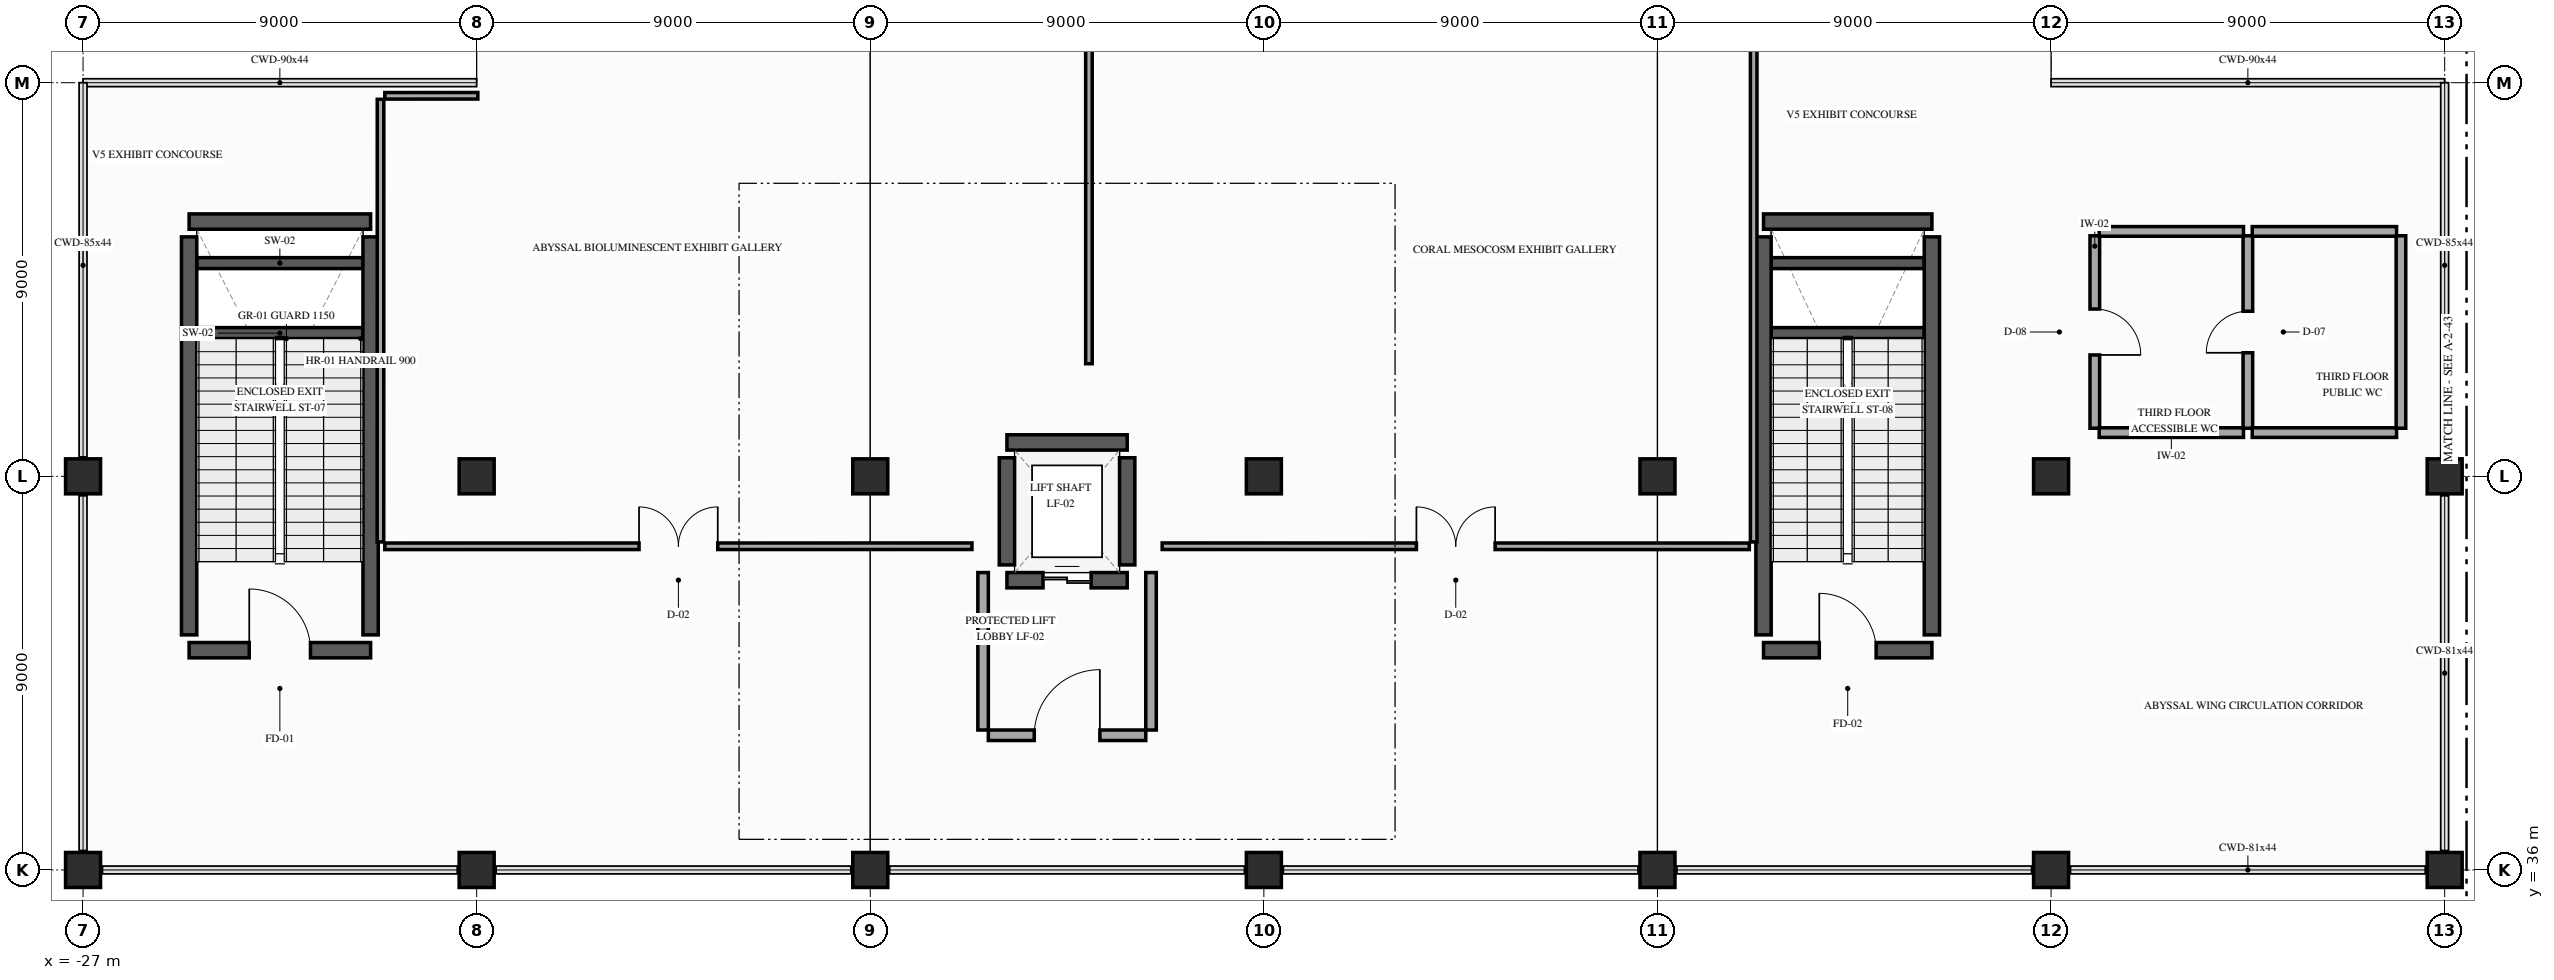
"""IFC4 building model, lengths in metres.
Left out: names, types, materials, properties, quantities, classifications, styles, units other than length and angle.
Written with IfcOpenShell. Run it as: python <this file> out.ifc"""

import sys

from ifc_helpers import new_model, si_unit, direction, frame, frame_2d, origin, origin_2d, place, context, subcontext, project, spatial, rectangle, extrude, element, fill, save


model = new_model("IFC4")
c1 = context("Model", 3, precision=1e-05, world=origin(), true_north=direction((0.0, 1.0)))
c2 = subcontext(c1, "Body", "Model", "MODEL_VIEW")
j1 = project(units=[si_unit("LENGTHUNIT", "METRE"), si_unit("PLANEANGLEUNIT", "RADIAN")], contexts=[c1])
p1 = place(None, origin())
s1 = spatial("IfcSite", under=j1, at=p1, CompositionType="ELEMENT")
p2 = place(p1, origin())
s2 = spatial("IfcBuilding", under=s1, at=p2, CompositionType="ELEMENT")
p3 = place(p2, frame((0.0, 0.0, 16.2)))
s3 = spatial("IfcBuildingStorey", under=s2, at=p3, CompositionType="ELEMENT", Elevation=16.2)
for number, where, z_axis, x_axis in (
    (1, (-27.0, 36.0, 0.0), (0.0, 0.0, 1.0), (1.0, 0.0, 0.0)),
    (2, (-27.0, 45.0, 0.0), (0.0, 0.0, 1.0), (1.0, 0.0, 0.0)),
    (3, (-18.0, 36.0, 0.0), (0.0, 0.0, 1.0), (1.0, 0.0, 0.0)),
    (4, (-18.0, 45.0, 0.0), (0.0, 0.0, 1.0), (1.0, 0.0, 0.0)),
    (5, (-9.0, 36.0, 0.0), (0.0, 0.0, 1.0), (1.0, 0.0, 0.0)),
    (6, (-9.0, 45.0, 0.0), (0.0, 0.0, 1.0), (1.0, 0.0, 0.0)),
    (7, (0.0, 36.0, 0.0), (0.0, 0.0, 1.0), (1.0, 0.0, 0.0)),
    (8, (0.0, 45.0, 0.0), (0.0, 0.0, 1.0), (1.0, 0.0, 0.0)),
    (9, (9.0, 36.0, 0.0), (0.0, 0.0, 1.0), (1.0, 0.0, 0.0)),
    (10, (9.0, 45.0, 0.0), (0.0, 0.0, 1.0), (1.0, 0.0, 0.0)),
    (11, (18.0, 36.0, 0.0), (0.0, 0.0, 1.0), (1.0, 0.0, 0.0)),
    (12, (18.0, 45.0, 0.0), (0.0, 0.0, 1.0), (1.0, 0.0, 0.0)),
    (13, (27.0, 36.0, 0.0), (0.0, 0.0, 1.0), (1.0, 0.0, 0.0)),
    (14, (27.0, 45.0, 0.0), (0.0, 0.0, 1.0), (1.0, 0.0, 0.0)),
):
    element("IfcColumn", number, at=place(p3, frame(where, z_axis=z_axis, x_axis=x_axis)), inside=s3, PredefinedType="COLUMN", context=c2, shape_type="SweptSolid", body=[
        extrude(rectangle(XDim=0.8, YDim=0.8, at=origin_2d()), origin(), (0.0, 0.0, 1.0), 5.4),
    ])
for number, where, z_axis, x_axis in (
    (15, (-24.4, 48.275, 0.0), (0.0, 0.0, 1.0), (1.0, 0.0, 0.0)),
    (16, (-24.4, 49.875, 0.0), (0.0, 0.0, 1.0), (1.0, 0.0, 0.0)),
):
    element("IfcWall", number, at=place(p3, frame(where, z_axis=z_axis, x_axis=x_axis)), inside=s3, PredefinedType="SHEAR", context=c2, shape_type="SweptSolid", body=[
        extrude(rectangle(XDim=3.8, YDim=0.25, at=frame_2d((1.9, 0.0))), origin(), (0.0, 0.0, 1.0), 2.5),
    ])
p4 = place(p3, frame((-24.575, 41.025, 0.0), z_axis=(0.0, 0.0, 1.0), x_axis=(1.0, 0.0, 0.0)))
e17 = element("IfcWall", 17, at=p4, inside=s3, PredefinedType="SHEAR", context=c2, shape_type="SweptSolid", body=[
    extrude(rectangle(XDim=4.15, YDim=0.35, at=frame_2d((2.075, 0.0))), origin(), (0.0, 0.0, 1.0), 5.15),
])
p5 = place(p4, frame((1.375, 0.0, 0.0)))
e18 = element("IfcOpeningElement", 18, at=p5, cuts=e17, PredefinedType="OPENING", context=c2, shape_type="SweptSolid", body=[
    extrude(rectangle(XDim=1.4, YDim=2.2, at=frame_2d((0.7, 1.1))), frame((0.0, 0.185, 0.0), z_axis=(0.0, -1.0, 0.0), x_axis=(1.0, 0.0, 0.0)), (0.0, 0.0, 1.0), 0.37),
])
p6 = place(p3, frame((-24.575, 50.825, 0.0), z_axis=(0.0, 0.0, 1.0), x_axis=(1.0, 0.0, 0.0)))
e19 = element("IfcWall", 19, at=p6, inside=s3, PredefinedType="SHEAR", context=c2, shape_type="SweptSolid", body=[
    extrude(rectangle(XDim=4.15, YDim=0.35, at=frame_2d((2.075, 0.0))), origin(), (0.0, 0.0, 1.0), 5.15),
])
for number, where, z_axis, x_axis in (
    (20, (-24.575, 41.375, 0.0), (0.0, 0.0, 1.0), (0.0, 1.0, 0.0)),
    (21, (-20.425, 41.375, 0.0), (0.0, 0.0, 1.0), (0.0, 1.0, 0.0)),
):
    element("IfcWall", number, at=place(p3, frame(where, z_axis=z_axis, x_axis=x_axis)), inside=s3, PredefinedType="SHEAR", context=c2, shape_type="SweptSolid", body=[
        extrude(rectangle(XDim=9.1, YDim=0.35, at=frame_2d((4.55, 0.0))), origin(), (0.0, 0.0, 1.0), 5.15),
    ])
for number, where, z_axis, x_axis in (
    (22, (11.6, 48.275, 0.0), (0.0, 0.0, 1.0), (1.0, 0.0, 0.0)),
    (23, (11.6, 49.875, 0.0), (0.0, 0.0, 1.0), (1.0, 0.0, 0.0)),
):
    element("IfcWall", number, at=place(p3, frame(where, z_axis=z_axis, x_axis=x_axis)), inside=s3, PredefinedType="SHEAR", context=c2, shape_type="SweptSolid", body=[
        extrude(rectangle(XDim=3.5, YDim=0.25, at=frame_2d((1.75, 0.0))), origin(), (0.0, 0.0, 1.0), 2.5),
    ])
p7 = place(p3, frame((11.425, 41.025, 0.0), z_axis=(0.0, 0.0, 1.0), x_axis=(1.0, 0.0, 0.0)))
e24 = element("IfcWall", 24, at=p7, inside=s3, PredefinedType="SHEAR", context=c2, shape_type="SweptSolid", body=[
    extrude(rectangle(XDim=3.85, YDim=0.35, at=frame_2d((1.925, 0.0))), origin(), (0.0, 0.0, 1.0), 5.15),
])
p8 = place(p7, frame((1.275, 0.0, 0.0)))
e25 = element("IfcOpeningElement", 25, at=p8, cuts=e24, PredefinedType="OPENING", context=c2, shape_type="SweptSolid", body=[
    extrude(rectangle(XDim=1.3, YDim=2.2, at=frame_2d((0.65, 1.1))), frame((0.0, 0.185, 0.0), z_axis=(0.0, -1.0, 0.0), x_axis=(1.0, 0.0, 0.0)), (0.0, 0.0, 1.0), 0.37),
])
p9 = place(p3, frame((11.425, 50.825, 0.0), z_axis=(0.0, 0.0, 1.0), x_axis=(1.0, 0.0, 0.0)))
e26 = element("IfcWall", 26, at=p9, inside=s3, PredefinedType="SHEAR", context=c2, shape_type="SweptSolid", body=[
    extrude(rectangle(XDim=3.85, YDim=0.35, at=frame_2d((1.925, 0.0))), origin(), (0.0, 0.0, 1.0), 5.15),
])
for number, where, z_axis, x_axis in (
    (27, (11.425, 41.375, 0.0), (0.0, 0.0, 1.0), (0.0, 1.0, 0.0)),
    (28, (15.275, 41.375, 0.0), (0.0, 0.0, 1.0), (0.0, 1.0, 0.0)),
):
    element("IfcWall", number, at=place(p3, frame(where, z_axis=z_axis, x_axis=x_axis)), inside=s3, PredefinedType="SHEAR", context=c2, shape_type="SweptSolid", body=[
        extrude(rectangle(XDim=9.1, YDim=0.35, at=frame_2d((4.55, 0.0))), origin(), (0.0, 0.0, 1.0), 5.15),
    ])
p10 = place(p3, frame((-5.875, 42.625, 0.0), z_axis=(0.0, 0.0, 1.0), x_axis=(1.0, 0.0, 0.0)))
e29 = element("IfcWall", 29, at=p10, inside=s3, PredefinedType="SHEAR", context=c2, shape_type="SweptSolid", body=[
    extrude(rectangle(XDim=2.75, YDim=0.35, at=frame_2d((1.375, 0.0))), origin(), (0.0, 0.0, 1.0), 5.15),
])
p11 = place(p10, frame((0.825, 0.0, 0.0)))
e30 = element("IfcOpeningElement", 30, at=p11, cuts=e29, PredefinedType="OPENING", context=c2, shape_type="SweptSolid", body=[
    extrude(rectangle(XDim=1.1, YDim=2.2, at=frame_2d((0.55, 1.1))), frame((0.0, 0.185, 0.0), z_axis=(0.0, -1.0, 0.0), x_axis=(1.0, 0.0, 0.0)), (0.0, 0.0, 1.0), 0.37),
])
p12 = place(p3, frame((-3.125, 45.775, 0.0), z_axis=(0.0, 0.0, 1.0), x_axis=(-1.0, 0.0, 0.0)))
e31 = element("IfcWall", 31, at=p12, inside=s3, PredefinedType="SHEAR", context=c2, shape_type="SweptSolid", body=[
    extrude(rectangle(XDim=2.75, YDim=0.35, at=frame_2d((1.375, 0.0))), origin(), (0.0, 0.0, 1.0), 5.15),
])
for number, where, z_axis, x_axis in (
    (32, (-5.875, 42.975, 0.0), (0.0, 0.0, 1.0), (0.0, 1.0, 0.0)),
    (33, (-3.125, 42.975, 0.0), (0.0, 0.0, 1.0), (0.0, 1.0, 0.0)),
):
    element("IfcWall", number, at=place(p3, frame(where, z_axis=z_axis, x_axis=x_axis)), inside=s3, PredefinedType="SHEAR", context=c2, shape_type="SweptSolid", body=[
        extrude(rectangle(XDim=2.45, YDim=0.35, at=frame_2d((1.225, 0.0))), origin(), (0.0, 0.0, 1.0), 5.15),
    ])
p13 = place(p3, frame((-6.3, 39.08, 0.0), z_axis=(0.0, 0.0, 1.0), x_axis=(1.0, 0.0, 0.0)))
e34 = element("IfcWall", 34, at=p13, inside=s3, PredefinedType="PARTITIONING", context=c2, shape_type="SweptSolid", body=[
    extrude(rectangle(XDim=3.6, YDim=0.24, at=frame_2d((1.8, 0.0))), origin(), (0.0, 0.0, 1.0), 4.635),
])
p14 = place(p13, frame((1.05, 0.0, 0.0)))
e35 = element("IfcOpeningElement", 35, at=p14, cuts=e34, PredefinedType="OPENING", context=c2, shape_type="SweptSolid", body=[
    extrude(rectangle(XDim=1.5, YDim=2.2, at=frame_2d((0.75, 1.1))), frame((0.0, 0.13, 0.0), z_axis=(0.0, -1.0, 0.0), x_axis=(1.0, 0.0, 0.0)), (0.0, 0.0, 1.0), 0.26),
])
for number, where, z_axis, x_axis in (
    (36, (-6.42, 39.2, 0.0), (0.0, 0.0, 1.0), (0.0, 1.0, 0.0)),
    (37, (-2.58, 39.2, 0.0), (0.0, 0.0, 1.0), (0.0, 1.0, 0.0)),
):
    element("IfcWall", number, at=place(p3, frame(where, z_axis=z_axis, x_axis=x_axis)), inside=s3, PredefinedType="PARTITIONING", context=c2, shape_type="SweptSolid", body=[
        extrude(rectangle(XDim=3.6, YDim=0.24, at=frame_2d((1.8, 0.0))), origin(), (0.0, 0.0, 1.0), 4.635),
    ])
p15 = place(p3, frame((19.0, 50.5, 0.0), z_axis=(0.0, 0.0, 1.0), x_axis=(0.0, -1.0, 0.0)))
e38 = element("IfcWall", 38, at=p15, inside=s3, PredefinedType="PLUMBINGWALL", context=c2, shape_type="SweptSolid", body=[
    extrude(rectangle(XDim=4.4, YDim=0.22, at=frame_2d((2.2, 0.0))), origin(), (0.0, 0.0, 1.0), 5.05),
])
p16 = place(p15, frame((1.675, 0.0, 0.0)))
e39 = element("IfcOpeningElement", 39, at=p16, cuts=e38, PredefinedType="OPENING", context=c2, shape_type="SweptSolid", body=[
    extrude(rectangle(XDim=1.05, YDim=2.15, at=frame_2d((0.525, 1.075))), frame((0.0, 0.12, 0.0), z_axis=(0.0, -1.0, 0.0), x_axis=(1.0, 0.0, 0.0)), (0.0, 0.0, 1.0), 0.24),
])
p17 = place(p3, frame((19.1, 46.0, 0.0), z_axis=(0.0, 0.0, 1.0), x_axis=(1.0, 0.0, 0.0)))
e40 = element("IfcWall", 40, at=p17, inside=s3, PredefinedType="PLUMBINGWALL", context=c2, shape_type="SweptSolid", body=[
    extrude(rectangle(XDim=3.3, YDim=0.22, at=frame_2d((1.65, 0.0))), origin(), (0.0, 0.0, 1.0), 5.05),
])
p18 = place(p3, frame((22.5, 46.1, 0.0), z_axis=(0.0, 0.0, 1.0), x_axis=(0.0, 1.0, 0.0)))
e41 = element("IfcWall", 41, at=p18, inside=s3, PredefinedType="PLUMBINGWALL", context=c2, shape_type="SweptSolid", body=[
    extrude(rectangle(XDim=4.4, YDim=0.22, at=frame_2d((2.2, 0.0))), origin(), (0.0, 0.0, 1.0), 5.05),
])
p19 = place(p18, frame((1.725, 0.0, 0.0)))
e42 = element("IfcOpeningElement", 42, at=p19, cuts=e41, PredefinedType="OPENING", context=c2, shape_type="SweptSolid", body=[
    extrude(rectangle(XDim=0.95, YDim=2.15, at=frame_2d((0.475, 1.075))), frame((0.0, 0.12, 0.0), z_axis=(0.0, -1.0, 0.0), x_axis=(1.0, 0.0, 0.0)), (0.0, 0.0, 1.0), 0.24),
])
for number, where, z_axis, x_axis in (
    (43, (22.4, 50.6, 0.0), (0.0, 0.0, 1.0), (-1.0, 0.0, 0.0)),
    (44, (22.6, 46.0, 0.0), (0.0, 0.0, 1.0), (1.0, 0.0, 0.0)),
):
    element("IfcWall", number, at=place(p3, frame(where, z_axis=z_axis, x_axis=x_axis)), inside=s3, PredefinedType="PLUMBINGWALL", context=c2, shape_type="SweptSolid", body=[
        extrude(rectangle(XDim=3.3, YDim=0.22, at=frame_2d((1.65, 0.0))), origin(), (0.0, 0.0, 1.0), 5.05),
    ])
p20 = place(p3, frame((26.0, 46.1, 0.0), z_axis=(0.0, 0.0, 1.0), x_axis=(0.0, 1.0, 0.0)))
e45 = element("IfcWall", 45, at=p20, inside=s3, PredefinedType="PLUMBINGWALL", context=c2, shape_type="SweptSolid", body=[
    extrude(rectangle(XDim=4.4, YDim=0.22, at=frame_2d((2.2, 0.0))), origin(), (0.0, 0.0, 1.0), 5.05),
])
p21 = place(p3, frame((25.9, 50.6, 0.0), z_axis=(0.0, 0.0, 1.0), x_axis=(-1.0, 0.0, 0.0)))
e46 = element("IfcWall", 46, at=p21, inside=s3, PredefinedType="PLUMBINGWALL", context=c2, shape_type="SweptSolid", body=[
    extrude(rectangle(XDim=3.3, YDim=0.22, at=frame_2d((1.65, 0.0))), origin(), (0.0, 0.0, 1.0), 5.05),
])
p22 = place(p3, frame((-20.198, 53.62, 0.0), z_axis=(0.0, 0.0, 1.0), x_axis=(-0.000192994303, -0.999999981377, 0.0)))
e47 = element("IfcWall", 47, at=p22, inside=s3, PredefinedType="PARTITIONING", context=c2, shape_type="SweptSolid", body=[
    extrude(rectangle(XDim=10.12, YDim=0.15, at=frame_2d((5.06, 0.0))), origin(), (0.0, 0.0, 1.0), 5.05),
])
p23 = place(p3, frame((-20.1, 43.4, 0.0), z_axis=(0.0, 0.0, 1.0), x_axis=(0.999999986606, 0.000163669095, 0.0)))
e48 = element("IfcWall", 48, at=p23, inside=s3, PredefinedType="PARTITIONING", context=c2, shape_type="SweptSolid", body=[
    extrude(rectangle(XDim=13.425, YDim=0.15, at=frame_2d((6.712, 0.0))), origin(), (0.0, 0.0, 1.0), 4.435),
])
p24 = place(p23, frame((5.813, 0.0, 0.0)))
e49 = element("IfcOpeningElement", 49, at=p24, cuts=e48, PredefinedType="OPENING", context=c2, shape_type="SweptSolid", body=[
    extrude(rectangle(XDim=1.8, YDim=2.3, at=frame_2d((0.9, 1.15))), frame((0.0, 0.085, 0.0), z_axis=(0.0, -1.0, 0.0), x_axis=(1.0, 0.0, 0.0)), (0.0, 0.0, 1.0), 0.17),
])
p25 = place(p3, frame((-4.0, 47.575, 0.0), z_axis=(0.0, 0.0, 1.0), x_axis=(0.0, 1.0, 0.0)))
e50 = element("IfcWall", 50, at=p25, inside=s3, PredefinedType="PARTITIONING", context=c2, shape_type="SweptSolid", body=[
    extrude(rectangle(XDim=7.825, YDim=0.15, at=frame_2d((3.913, 0.0))), origin(), (0.0, 0.0, 1.0), 4.385),
])
p26 = place(p3, frame((-17.973, 53.701, 0.0), z_axis=(0.0, 0.0, 1.0), x_axis=(-0.999999894621, -0.000459084079, 0.0)))
e51 = element("IfcWall", 51, at=p26, inside=s3, PredefinedType="PARTITIONING", context=c2, shape_type="SweptSolid", body=[
    extrude(rectangle(XDim=2.127, YDim=0.15, at=frame_2d((1.063, 0.0))), origin(), (0.0, 0.0, 1.0), 4.435),
])
p27 = place(p3, frame((-2.325, 43.402, 0.0), z_axis=(0.0, 0.0, 1.0), x_axis=(0.999999986606, -0.000163669095, 0.0)))
e52 = element("IfcWall", 52, at=p27, inside=s3, PredefinedType="PARTITIONING", context=c2, shape_type="SweptSolid", body=[
    extrude(rectangle(XDim=13.425, YDim=0.15, at=frame_2d((6.712, 0.0))), origin(), (0.0, 0.0, 1.0), 4.435),
])
p28 = place(p27, frame((5.813, 0.0, 0.0)))
e53 = element("IfcOpeningElement", 53, at=p28, cuts=e52, PredefinedType="OPENING", context=c2, shape_type="SweptSolid", body=[
    extrude(rectangle(XDim=1.8, YDim=2.3, at=frame_2d((0.9, 1.15))), frame((0.0, 0.085, 0.0), z_axis=(0.0, -1.0, 0.0), x_axis=(1.0, 0.0, 0.0)), (0.0, 0.0, 1.0), 0.17),
])
p29 = place(p3, frame((11.2, 43.5, 0.0), z_axis=(0.0, 0.0, 1.0), x_axis=(0.0, 1.0, 0.0)))
e54 = element("IfcWall", 54, at=p29, inside=s3, PredefinedType="PARTITIONING", context=c2, shape_type="SweptSolid", body=[
    extrude(rectangle(XDim=11.9, YDim=0.15, at=frame_2d((5.95, 0.0))), origin(), (0.0, 0.0, 1.0), 4.385),
])
p30 = place(p5, origin())
e55 = element("IfcDoor", 55, at=p30, inside=s3, OperationType="SINGLE_SWING_LEFT", PredefinedType="DOOR", context=c2, shape_type="SweptSolid", body=[
    extrude(rectangle(XDim=1.4, YDim=2.2, at=frame_2d((0.7, 1.1))), frame((0.0, 0.025, 0.0), z_axis=(0.0, -1.0, 0.0), x_axis=(1.0, 0.0, 0.0)), (0.0, 0.0, 1.0), 0.05),
])
fill(e18, e55)
p31 = place(p8, origin())
e56 = element("IfcDoor", 56, at=p31, inside=s3, OperationType="SINGLE_SWING_LEFT", PredefinedType="DOOR", context=c2, shape_type="SweptSolid", body=[
    extrude(rectangle(XDim=1.3, YDim=2.2, at=frame_2d((0.65, 1.1))), frame((0.0, 0.025, 0.0), z_axis=(0.0, -1.0, 0.0), x_axis=(1.0, 0.0, 0.0)), (0.0, 0.0, 1.0), 0.05),
])
fill(e25, e56)
p32 = place(p11, origin())
e57 = element("IfcDoor", 57, at=p32, inside=s3, OperationType="DOUBLE_DOOR_SLIDING", PredefinedType="DOOR", context=c2, shape_type="SweptSolid", body=[
    extrude(rectangle(XDim=1.1, YDim=2.2, at=frame_2d((0.55, 1.1))), frame((0.0, 0.025, 0.0), z_axis=(0.0, -1.0, 0.0), x_axis=(1.0, 0.0, 0.0)), (0.0, 0.0, 1.0), 0.05),
])
fill(e30, e57)
p33 = place(p14, origin())
e58 = element("IfcDoor", 58, at=p33, inside=s3, OperationType="SINGLE_SWING_RIGHT", PredefinedType="DOOR", context=c2, shape_type="SweptSolid", body=[
    extrude(rectangle(XDim=1.5, YDim=2.2, at=frame_2d((0.75, 1.1))), frame((0.0, 0.025, 0.0), z_axis=(0.0, -1.0, 0.0), x_axis=(1.0, 0.0, 0.0)), (0.0, 0.0, 1.0), 0.05),
])
fill(e35, e58)
p34 = place(p16, origin())
e59 = element("IfcDoor", 59, at=p34, inside=s3, OperationType="SINGLE_SWING_RIGHT", PredefinedType="DOOR", context=c2, shape_type="SweptSolid", body=[
    extrude(rectangle(XDim=1.05, YDim=2.15, at=frame_2d((0.525, 1.075))), frame((0.0, 0.025, 0.0), z_axis=(0.0, -1.0, 0.0), x_axis=(1.0, 0.0, 0.0)), (0.0, 0.0, 1.0), 0.05),
])
fill(e39, e59)
p35 = place(p19, origin())
e60 = element("IfcDoor", 60, at=p35, inside=s3, OperationType="SINGLE_SWING_LEFT", PredefinedType="DOOR", context=c2, shape_type="SweptSolid", body=[
    extrude(rectangle(XDim=0.95, YDim=2.15, at=frame_2d((0.475, 1.075))), frame((0.0, 0.025, 0.0), z_axis=(0.0, -1.0, 0.0), x_axis=(1.0, 0.0, 0.0)), (0.0, 0.0, 1.0), 0.05),
])
fill(e42, e60)
p36 = place(p24, origin())
e61 = element("IfcDoor", 61, at=p36, inside=s3, OperationType="DOUBLE_DOOR_SINGLE_SWING", PredefinedType="DOOR", context=c2, shape_type="SweptSolid", body=[
    extrude(rectangle(XDim=1.8, YDim=2.3, at=frame_2d((0.9, 1.15))), frame((0.0, 0.025, 0.0), z_axis=(0.0, -1.0, 0.0), x_axis=(1.0, 0.0, 0.0)), (0.0, 0.0, 1.0), 0.05),
])
fill(e49, e61)
p37 = place(p28, origin())
e62 = element("IfcDoor", 62, at=p37, inside=s3, OperationType="DOUBLE_DOOR_SINGLE_SWING", PredefinedType="DOOR", context=c2, shape_type="SweptSolid", body=[
    extrude(rectangle(XDim=1.8, YDim=2.3, at=frame_2d((0.9, 1.15))), frame((0.0, 0.025, 0.0), z_axis=(0.0, -1.0, 0.0), x_axis=(1.0, 0.0, 0.0)), (0.0, 0.0, 1.0), 0.05),
])
fill(e53, e62)
save(model, sys.argv[1])
